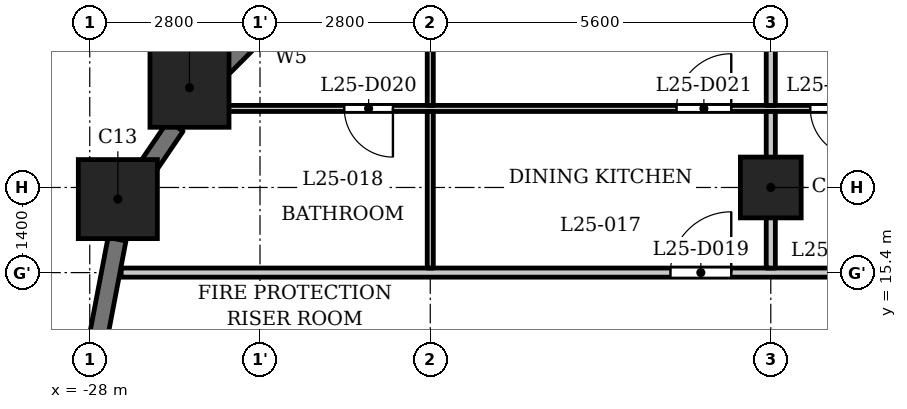
"""IFC4 building model, lengths in metres.
Left out: names, types, materials, properties, quantities, classifications, styles, units other than length and angle.
Written with IfcOpenShell. Run it as: python <this file> out.ifc"""

import sys

from ifc_helpers import new_model, si_unit, direction, frame, frame_2d, origin, origin_2d, place, context, subcontext, project, spatial, rectangle, extrude, element, fill, save


model = new_model("IFC4")
c1 = context("Model", 3, precision=1e-05, world=origin(), true_north=direction((0.0, 1.0)))
c2 = subcontext(c1, "Body", "Model", "MODEL_VIEW")
j1 = project(units=[si_unit("LENGTHUNIT", "METRE"), si_unit("PLANEANGLEUNIT", "RADIAN")], contexts=[c1])
p1 = place(None, origin())
s1 = spatial("IfcSite", under=j1, at=p1, CompositionType="ELEMENT")
p2 = place(p1, origin())
s2 = spatial("IfcBuilding", under=s1, at=p2, CompositionType="ELEMENT")
p3 = place(p2, frame((0.0, 0.0, 100.8)))
s3 = spatial("IfcBuildingStorey", under=s2, at=p3, CompositionType="ELEMENT", Elevation=100.8)
for number, where, z_axis, x_axis in (
    (1, (-26.36, 18.44, 0.0), (0.0, 0.0, 1.0), (1.0, 0.0, 0.0)),
    (2, (-27.538, 16.609, 0.0), (0.0, 0.0, 1.0), (1.0, 0.0, 0.0)),
):
    element("IfcColumn", number, at=place(p3, frame(where, z_axis=z_axis, x_axis=x_axis)), inside=s3, PredefinedType="COLUMN", context=c2, shape_type="SweptSolid", body=[
        extrude(rectangle(XDim=1.3, YDim=1.3, at=origin_2d()), origin(), (0.0, 0.0, 1.0), 3.5),
    ])
p4 = place(p3, frame((-16.8, 16.8, 0.0), z_axis=(0.0, 0.0, 1.0), x_axis=(1.0, 0.0, 0.0)))
e3 = element("IfcColumn", 3, at=p4, inside=s3, PredefinedType="COLUMN", context=c2, shape_type="SweptSolid", body=[
    extrude(rectangle(XDim=1.0, YDim=1.0, at=origin_2d()), origin(), (0.0, 0.0, 1.0), 3.5),
])
p5 = place(p3, frame((-23.991, 20.597, 0.0), z_axis=(0.0, 0.0, 1.0), x_axis=(-0.707106781187, -0.707106781187, 0.0)))
e4 = element("IfcWall", 4, at=p5, inside=s3, PredefinedType="SOLIDWALL", context=c2, shape_type="SweptSolid", body=[
    extrude(rectangle(XDim=2.55, YDim=0.3, at=frame_2d((1.275, 0.0))), origin(), (0.0, 0.0, 1.0), 2.4),
])
p6 = place(p5, frame((0.875, 0.0, 0.6)))
e5 = element("IfcOpeningElement", 5, at=p6, cuts=e4, PredefinedType="OPENING", context=c2, shape_type="SweptSolid", body=[
    extrude(rectangle(XDim=0.8, YDim=1.55, at=frame_2d((0.4, 0.775))), frame((0.0, 0.16, 0.0), z_axis=(0.0, -1.0, 0.0), x_axis=(1.0, 0.0, 0.0)), (0.0, 0.0, 1.0), 0.32),
])
p7 = place(p3, frame((-26.589, 17.81, 0.0), z_axis=(0.0, 0.0, 1.0), x_axis=(-0.562066330934, -0.827092159091, 0.0)))
e6 = element("IfcWall", 6, at=p7, inside=s3, PredefinedType="SOLIDWALL", context=c2, shape_type="SweptSolid", body=[
    extrude(rectangle(XDim=0.877, YDim=0.3, at=frame_2d((0.438, 0.0))), origin(), (0.0, 0.0, 1.0), 3.2),
])
p8 = place(p3, frame((-27.552, 15.949, 0.0), z_axis=(0.0, 0.0, 1.0), x_axis=(-0.187279751651, -0.982306619453, 0.0)))
e7 = element("IfcWall", 7, at=p8, inside=s3, PredefinedType="SOLIDWALL", context=c2, shape_type="SweptSolid", body=[
    extrude(rectangle(XDim=1.606, YDim=0.3, at=frame_2d((0.803, 0.0))), origin(), (0.0, 0.0, 1.0), 2.4),
])
p9 = place(p3, frame((-27.484, 15.4, 0.0), z_axis=(0.0, 0.0, 1.0), x_axis=(1.0, 0.0, 0.0)))
e8 = element("IfcWall", 8, at=p9, inside=s3, PredefinedType="PARTITIONING", context=c2, shape_type="SweptSolid", body=[
    extrude(rectangle(XDim=54.968, YDim=0.15, at=frame_2d((27.484, 0.0))), origin(), (0.0, 0.0, 1.0), 3.2),
])
p10 = place(p9, frame((9.034, 0.0, 0.0)))
e9 = element("IfcOpeningElement", 9, at=p10, cuts=e8, PredefinedType="OPENING", context=c2, shape_type="SweptSolid", body=[
    extrude(rectangle(XDim=1.0, YDim=2.1, at=frame_2d((0.5, 1.05))), frame((0.0, 0.085, 0.0), z_axis=(0.0, -1.0, 0.0), x_axis=(1.0, 0.0, 0.0)), (0.0, 0.0, 1.0), 0.17),
])
p11 = place(p9, frame((14.634, 0.0, 0.0)))
e10 = element("IfcOpeningElement", 10, at=p11, cuts=e8, PredefinedType="OPENING", context=c2, shape_type="SweptSolid", body=[
    extrude(rectangle(XDim=1.0, YDim=2.1, at=frame_2d((0.5, 1.05))), frame((0.0, 0.085, 0.0), z_axis=(0.0, -1.0, 0.0), x_axis=(1.0, 0.0, 0.0)), (0.0, 0.0, 1.0), 0.17),
])
p12 = place(p9, frame((19.984, 0.0, 0.0)))
e11 = element("IfcOpeningElement", 11, at=p12, cuts=e8, PredefinedType="OPENING", context=c2, shape_type="SweptSolid", body=[
    extrude(rectangle(XDim=1.0, YDim=2.1, at=frame_2d((0.5, 1.05))), frame((0.0, 0.085, 0.0), z_axis=(0.0, -1.0, 0.0), x_axis=(1.0, 0.0, 0.0)), (0.0, 0.0, 1.0), 0.17),
])
p13 = place(p9, frame((23.234, 0.0, 0.0)))
e12 = element("IfcOpeningElement", 12, at=p13, cuts=e8, PredefinedType="OPENING", context=c2, shape_type="SweptSolid", body=[
    extrude(rectangle(XDim=1.0, YDim=2.1, at=frame_2d((0.5, 1.05))), frame((0.0, 0.085, 0.0), z_axis=(0.0, -1.0, 0.0), x_axis=(1.0, 0.0, 0.0)), (0.0, 0.0, 1.0), 0.17),
])
p14 = place(p9, frame((28.184, 0.0, 0.0)))
e13 = element("IfcOpeningElement", 13, at=p14, cuts=e8, PredefinedType="OPENING", context=c2, shape_type="SweptSolid", body=[
    extrude(rectangle(XDim=1.0, YDim=2.1, at=frame_2d((0.5, 1.05))), frame((0.0, 0.085, 0.0), z_axis=(0.0, -1.0, 0.0), x_axis=(1.0, 0.0, 0.0)), (0.0, 0.0, 1.0), 0.17),
])
p15 = place(p9, frame((39.284, 0.0, 0.0)))
e14 = element("IfcOpeningElement", 14, at=p15, cuts=e8, PredefinedType="OPENING", context=c2, shape_type="SweptSolid", body=[
    extrude(rectangle(XDim=1.0, YDim=2.1, at=frame_2d((0.5, 1.05))), frame((0.0, 0.085, 0.0), z_axis=(0.0, -1.0, 0.0), x_axis=(1.0, 0.0, 0.0)), (0.0, 0.0, 1.0), 0.17),
])
p16 = place(p9, frame((48.234, 0.0, 0.0)))
e15 = element("IfcOpeningElement", 15, at=p16, cuts=e8, PredefinedType="OPENING", context=c2, shape_type="SweptSolid", body=[
    extrude(rectangle(XDim=1.0, YDim=2.1, at=frame_2d((0.5, 1.05))), frame((0.0, 0.085, 0.0), z_axis=(0.0, -1.0, 0.0), x_axis=(1.0, 0.0, 0.0)), (0.0, 0.0, 1.0), 0.17),
])
p17 = place(p3, frame((-26.44, 18.1, 0.0), z_axis=(0.0, 0.0, 1.0), x_axis=(1.0, 0.0, 0.0)))
e16 = element("IfcWall", 16, at=p17, inside=s3, PredefinedType="PARTITIONING", context=c2, shape_type="SweptSolid", body=[
    extrude(rectangle(XDim=52.63, YDim=0.1, at=frame_2d((26.315, 0.0))), origin(), (0.0, 0.0, 1.0), 3.2),
])
p18 = place(p17, frame((2.626, 0.0, 0.0)))
e17 = element("IfcOpeningElement", 17, at=p18, cuts=e16, PredefinedType="OPENING", context=c2, shape_type="SweptSolid", body=[
    extrude(rectangle(XDim=0.8, YDim=2.1, at=frame_2d((0.4, 1.05))), frame((0.0, 0.06, 0.0), z_axis=(0.0, -1.0, 0.0), x_axis=(1.0, 0.0, 0.0)), (0.0, 0.0, 1.0), 0.12),
])
p19 = place(p17, frame((8.09, 0.0, 0.0)))
e18 = element("IfcOpeningElement", 18, at=p19, cuts=e16, PredefinedType="OPENING", context=c2, shape_type="SweptSolid", body=[
    extrude(rectangle(XDim=0.9, YDim=2.1, at=frame_2d((0.45, 1.05))), frame((0.0, 0.06, 0.0), z_axis=(0.0, -1.0, 0.0), x_axis=(1.0, 0.0, 0.0)), (0.0, 0.0, 1.0), 0.12),
])
p20 = place(p17, frame((10.29, 0.0, 0.0)))
e19 = element("IfcOpeningElement", 19, at=p20, cuts=e16, PredefinedType="OPENING", context=c2, shape_type="SweptSolid", body=[
    extrude(rectangle(XDim=0.8, YDim=2.1, at=frame_2d((0.4, 1.05))), frame((0.0, 0.06, 0.0), z_axis=(0.0, -1.0, 0.0), x_axis=(1.0, 0.0, 0.0)), (0.0, 0.0, 1.0), 0.12),
])
p21 = place(p17, frame((13.69, 0.0, 0.0)))
e20 = element("IfcOpeningElement", 20, at=p21, cuts=e16, PredefinedType="OPENING", context=c2, shape_type="SweptSolid", body=[
    extrude(rectangle(XDim=0.9, YDim=2.1, at=frame_2d((0.45, 1.05))), frame((0.0, 0.06, 0.0), z_axis=(0.0, -1.0, 0.0), x_axis=(1.0, 0.0, 0.0)), (0.0, 0.0, 1.0), 0.12),
])
p22 = place(p17, frame((15.89, 0.0, 0.0)))
e21 = element("IfcOpeningElement", 21, at=p22, cuts=e16, PredefinedType="OPENING", context=c2, shape_type="SweptSolid", body=[
    extrude(rectangle(XDim=0.8, YDim=2.1, at=frame_2d((0.4, 1.05))), frame((0.0, 0.06, 0.0), z_axis=(0.0, -1.0, 0.0), x_axis=(1.0, 0.0, 0.0)), (0.0, 0.0, 1.0), 0.12),
])
p23 = place(p17, frame((19.04, 0.0, 0.0)))
e22 = element("IfcOpeningElement", 22, at=p23, cuts=e16, PredefinedType="OPENING", context=c2, shape_type="SweptSolid", body=[
    extrude(rectangle(XDim=0.9, YDim=2.1, at=frame_2d((0.45, 1.05))), frame((0.0, 0.06, 0.0), z_axis=(0.0, -1.0, 0.0), x_axis=(1.0, 0.0, 0.0)), (0.0, 0.0, 1.0), 0.12),
])
p24 = place(p17, frame((24.99, 0.0, 0.0)))
e23 = element("IfcOpeningElement", 23, at=p24, cuts=e16, PredefinedType="OPENING", context=c2, shape_type="SweptSolid", body=[
    extrude(rectangle(XDim=0.8, YDim=2.1, at=frame_2d((0.4, 1.05))), frame((0.0, 0.06, 0.0), z_axis=(0.0, -1.0, 0.0), x_axis=(1.0, 0.0, 0.0)), (0.0, 0.0, 1.0), 0.12),
])
p25 = place(p17, frame((22.29, 0.0, 0.0)))
e24 = element("IfcOpeningElement", 24, at=p25, cuts=e16, PredefinedType="OPENING", context=c2, shape_type="SweptSolid", body=[
    extrude(rectangle(XDim=0.9, YDim=2.1, at=frame_2d((0.45, 1.05))), frame((0.0, 0.06, 0.0), z_axis=(0.0, -1.0, 0.0), x_axis=(1.0, 0.0, 0.0)), (0.0, 0.0, 1.0), 0.12),
])
p26 = place(p17, frame((32.69, 0.0, 0.0)))
e25 = element("IfcOpeningElement", 25, at=p26, cuts=e16, PredefinedType="OPENING", context=c2, shape_type="SweptSolid", body=[
    extrude(rectangle(XDim=0.8, YDim=2.1, at=frame_2d((0.4, 1.05))), frame((0.0, 0.06, 0.0), z_axis=(0.0, -1.0, 0.0), x_axis=(1.0, 0.0, 0.0)), (0.0, 0.0, 1.0), 0.12),
])
p27 = place(p17, frame((26.99, 0.0, 0.0)))
e26 = element("IfcOpeningElement", 26, at=p27, cuts=e16, PredefinedType="OPENING", context=c2, shape_type="SweptSolid", body=[
    extrude(rectangle(XDim=0.9, YDim=2.1, at=frame_2d((0.45, 1.05))), frame((0.0, 0.06, 0.0), z_axis=(0.0, -1.0, 0.0), x_axis=(1.0, 0.0, 0.0)), (0.0, 0.0, 1.0), 0.12),
])
p28 = place(p17, frame((41.29, 0.0, 0.0)))
e27 = element("IfcOpeningElement", 27, at=p28, cuts=e16, PredefinedType="OPENING", context=c2, shape_type="SweptSolid", body=[
    extrude(rectangle(XDim=0.8, YDim=2.1, at=frame_2d((0.4, 1.05))), frame((0.0, 0.06, 0.0), z_axis=(0.0, -1.0, 0.0), x_axis=(1.0, 0.0, 0.0)), (0.0, 0.0, 1.0), 0.12),
])
p29 = place(p17, frame((38.34, 0.0, 0.0)))
e28 = element("IfcOpeningElement", 28, at=p29, cuts=e16, PredefinedType="OPENING", context=c2, shape_type="SweptSolid", body=[
    extrude(rectangle(XDim=0.9, YDim=2.1, at=frame_2d((0.45, 1.05))), frame((0.0, 0.06, 0.0), z_axis=(0.0, -1.0, 0.0), x_axis=(1.0, 0.0, 0.0)), (0.0, 0.0, 1.0), 0.12),
])
p30 = place(p17, frame((50.74, 0.0, 0.0)))
e29 = element("IfcOpeningElement", 29, at=p30, cuts=e16, PredefinedType="OPENING", context=c2, shape_type="SweptSolid", body=[
    extrude(rectangle(XDim=0.8, YDim=2.1, at=frame_2d((0.4, 1.05))), frame((0.0, 0.06, 0.0), z_axis=(0.0, -1.0, 0.0), x_axis=(1.0, 0.0, 0.0)), (0.0, 0.0, 1.0), 0.12),
])
p31 = place(p17, frame((47.29, 0.0, 0.0)))
e30 = element("IfcOpeningElement", 30, at=p31, cuts=e16, PredefinedType="OPENING", context=c2, shape_type="SweptSolid", body=[
    extrude(rectangle(XDim=0.9, YDim=2.1, at=frame_2d((0.45, 1.05))), frame((0.0, 0.06, 0.0), z_axis=(0.0, -1.0, 0.0), x_axis=(1.0, 0.0, 0.0)), (0.0, 0.0, 1.0), 0.12),
])
p32 = place(p3, frame((-22.4, 15.475, 0.0), z_axis=(0.0, 0.0, 1.0), x_axis=(0.0, 1.0, 0.0)))
e31 = element("IfcWall", 31, at=p32, inside=s3, PredefinedType="PARTITIONING", context=c2, shape_type="SweptSolid", body=[
    extrude(rectangle(XDim=2.575, YDim=0.1, at=frame_2d((1.288, 0.0))), origin(), (0.0, 0.0, 1.0), 3.2),
])
p33 = place(p3, frame((-22.4, 18.15, 0.0), z_axis=(0.0, 0.0, 1.0), x_axis=(0.0, 1.0, 0.0)))
e32 = element("IfcWall", 32, at=p33, inside=s3, PredefinedType="PARTITIONING", context=c2, shape_type="SweptSolid", body=[
    extrude(rectangle(XDim=3.57, YDim=0.1, at=frame_2d((1.785, 0.0))), origin(), (0.0, 0.0, 1.0), 3.2),
])
p34 = place(p33, frame((1.298, 0.0, 0.0)))
e33 = element("IfcOpeningElement", 33, at=p34, cuts=e32, PredefinedType="OPENING", context=c2, shape_type="SweptSolid", body=[
    extrude(rectangle(XDim=0.9, YDim=2.1, at=frame_2d((0.45, 1.05))), frame((0.0, 0.06, 0.0), z_axis=(0.0, -1.0, 0.0), x_axis=(1.0, 0.0, 0.0)), (0.0, 0.0, 1.0), 0.12),
])
p35 = place(p3, frame((-16.8, 15.475, 0.0), z_axis=(0.0, 0.0, 1.0), x_axis=(0.0, 1.0, 0.0)))
e34 = element("IfcWall", 34, at=p35, inside=s3, PredefinedType="PARTITIONING", context=c2, shape_type="SweptSolid", body=[
    extrude(rectangle(XDim=2.575, YDim=0.15, at=frame_2d((1.288, 0.0))), origin(), (0.0, 0.0, 1.0), 3.2),
])
p36 = place(p3, frame((-16.8, 18.15, 0.0), z_axis=(0.0, 0.0, 1.0), x_axis=(0.0, 1.0, 0.0)))
e35 = element("IfcWall", 35, at=p36, inside=s3, PredefinedType="PARTITIONING", context=c2, shape_type="SweptSolid", body=[
    extrude(rectangle(XDim=4.88, YDim=0.15, at=frame_2d((2.44, 0.0))), origin(), (0.0, 0.0, 1.0), 3.2),
])
p37 = place(p10, origin())
e36 = element("IfcDoor", 36, at=p37, inside=s3, OperationType="SINGLE_SWING_LEFT", PredefinedType="DOOR", context=c2, shape_type="SweptSolid", body=[
    extrude(rectangle(XDim=1.0, YDim=2.1, at=frame_2d((0.5, 1.05))), frame((0.0, 0.025, 0.0), z_axis=(0.0, -1.0, 0.0), x_axis=(1.0, 0.0, 0.0)), (0.0, 0.0, 1.0), 0.05),
])
fill(e9, e36)
p38 = place(p18, origin())
e37 = element("IfcDoor", 37, at=p38, inside=s3, OperationType="SINGLE_SWING_RIGHT", PredefinedType="DOOR", context=c2, shape_type="SweptSolid", body=[
    extrude(rectangle(XDim=0.8, YDim=2.1, at=frame_2d((0.4, 1.05))), frame((0.0, 0.025, 0.0), z_axis=(0.0, -1.0, 0.0), x_axis=(1.0, 0.0, 0.0)), (0.0, 0.0, 1.0), 0.05),
])
fill(e17, e37)
p39 = place(p19, origin())
e38 = element("IfcDoor", 38, at=p39, inside=s3, OperationType="SINGLE_SWING_LEFT", PredefinedType="DOOR", context=c2, shape_type="SweptSolid", body=[
    extrude(rectangle(XDim=0.9, YDim=2.1, at=frame_2d((0.45, 1.05))), frame((0.0, 0.025, 0.0), z_axis=(0.0, -1.0, 0.0), x_axis=(1.0, 0.0, 0.0)), (0.0, 0.0, 1.0), 0.05),
])
fill(e18, e38)
p40 = place(p20, origin())
e39 = element("IfcDoor", 39, at=p40, inside=s3, OperationType="SINGLE_SWING_RIGHT", PredefinedType="DOOR", context=c2, shape_type="SweptSolid", body=[
    extrude(rectangle(XDim=0.8, YDim=2.1, at=frame_2d((0.4, 1.05))), frame((0.0, 0.025, 0.0), z_axis=(0.0, -1.0, 0.0), x_axis=(1.0, 0.0, 0.0)), (0.0, 0.0, 1.0), 0.05),
])
fill(e19, e39)
save(model, sys.argv[1])
